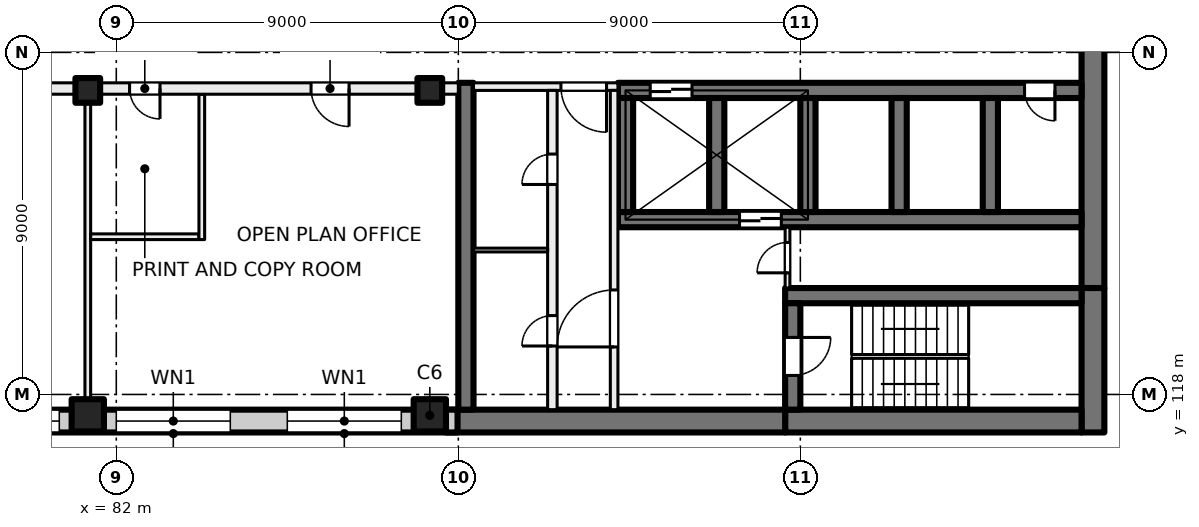
"""IFC4 building model, lengths in metres.
Left out: names, types, materials, properties, quantities, classifications, styles, units other than length and angle.
Written with IfcOpenShell. Run it as: python <this file> out.ifc"""

import sys

from ifc_helpers import new_model, si_unit, direction, frame, frame_2d, origin, origin_2d, place, context, subcontext, project, spatial, rectangle, extrude, element, fill, save


model = new_model("IFC4")
c1 = context("Model", 3, precision=1e-05, world=origin(), true_north=direction((0.0, 1.0)))
c2 = subcontext(c1, "Body", "Model", "MODEL_VIEW")
j1 = project(units=[si_unit("LENGTHUNIT", "METRE"), si_unit("PLANEANGLEUNIT", "RADIAN")], contexts=[c1])
p1 = place(None, origin())
s1 = spatial("IfcSite", under=j1, at=p1, CompositionType="ELEMENT")
p2 = place(p1, origin())
s2 = spatial("IfcBuilding", under=s1, at=p2, CompositionType="ELEMENT")
p3 = place(p2, frame((0.0, 0.0, 93.0)))
s3 = spatial("IfcBuildingStorey", under=s2, at=p3, CompositionType="ELEMENT", Elevation=93.0)
for number, where, z_axis, x_axis in (
    (1, (81.25, 126.0, 0.0), (0.0, 0.0, 1.0), (1.0, 0.0, 0.0)),
    (2, (90.25, 126.0, 0.0), (0.0, 0.0, 1.0), (1.0, 0.0, 0.0)),
):
    element("IfcColumn", number, at=place(p3, frame(where, z_axis=z_axis, x_axis=x_axis)), inside=s3, PredefinedType="COLUMN", context=c2, shape_type="SweptSolid", body=[
        extrude(rectangle(XDim=0.65, YDim=0.65, at=origin_2d()), origin(), (0.0, 0.0, 1.0), 4.0),
    ])
for number, where, z_axis, x_axis in (
    (3, (81.25, 117.45, 0.0), (0.0, 0.0, 1.0), (1.0, 0.0, 0.0)),
    (4, (90.25, 117.45, 0.0), (0.0, 0.0, 1.0), (1.0, 0.0, 0.0)),
):
    element("IfcColumn", number, at=place(p3, frame(where, z_axis=z_axis, x_axis=x_axis)), inside=s3, PredefinedType="COLUMN", context=c2, shape_type="SweptSolid", body=[
        extrude(rectangle(XDim=0.85, YDim=0.85, at=origin_2d()), origin(), (0.0, 0.0, 1.0), 4.0),
    ])
p4 = place(p3, frame((107.7, 135.2, 0.0), z_axis=(0.0, 0.0, 1.0), x_axis=(0.0, -1.0, 0.0)))
e5 = element("IfcWall", 5, at=p4, inside=s3, PredefinedType="SHEAR", context=c2, shape_type="SweptSolid", body=[
    extrude(rectangle(XDim=14.4, YDim=0.6, at=frame_2d((7.2, 0.0))), origin(), (0.0, 0.0, 1.0), 4.0),
])
p5 = place(p3, frame((107.7, 120.8, 0.0), z_axis=(0.0, 0.0, 1.0), x_axis=(0.0, -1.0, 0.0)))
e6 = element("IfcWall", 6, at=p5, inside=s3, PredefinedType="SHEAR", context=c2, shape_type="SweptSolid", body=[
    extrude(rectangle(XDim=3.8, YDim=0.6, at=frame_2d((1.9, 0.0))), origin(), (0.0, 0.0, 1.0), 4.0),
])
p6 = place(p3, frame((107.4, 117.3, 0.0), z_axis=(0.0, 0.0, 1.0), x_axis=(-1.0, 0.0, 0.0)))
e7 = element("IfcWall", 7, at=p6, inside=s3, PredefinedType="SHEAR", context=c2, shape_type="SweptSolid", body=[
    extrude(rectangle(XDim=7.8, YDim=0.6, at=frame_2d((3.9, 0.0))), origin(), (0.0, 0.0, 1.0), 4.0),
])
p7 = place(p3, frame((99.6, 117.3, 0.0), z_axis=(0.0, 0.0, 1.0), x_axis=(-1.0, 0.0, 0.0)))
e8 = element("IfcWall", 8, at=p7, inside=s3, PredefinedType="SHEAR", context=c2, shape_type="SweptSolid", body=[
    extrude(rectangle(XDim=8.925, YDim=0.6, at=frame_2d((4.462, 0.0))), origin(), (0.0, 0.0, 1.0), 4.0),
])
p8 = place(p3, frame((107.4, 120.6, 0.0), z_axis=(0.0, 0.0, 1.0), x_axis=(-1.0, 0.0, 0.0)))
e9 = element("IfcWall", 9, at=p8, inside=s3, PredefinedType="SHEAR", context=c2, shape_type="SweptSolid", body=[
    extrude(rectangle(XDim=7.8, YDim=0.4, at=frame_2d((3.9, 0.0))), origin(), (0.0, 0.0, 1.0), 4.0),
])
p9 = place(p3, frame((99.8, 120.4, 0.0), z_axis=(0.0, 0.0, 1.0), x_axis=(0.0, -1.0, 0.0)))
e10 = element("IfcWall", 10, at=p9, inside=s3, PredefinedType="SHEAR", context=c2, shape_type="SweptSolid", body=[
    extrude(rectangle(XDim=2.8, YDim=0.4, at=frame_2d((1.4, 0.0))), origin(), (0.0, 0.0, 1.0), 4.0),
])
p10 = place(p9, frame((0.9, 0.0, 0.0)))
e11 = element("IfcOpeningElement", 11, at=p10, cuts=e10, PredefinedType="OPENING", context=c2, shape_type="SweptSolid", body=[
    extrude(rectangle(XDim=1.0, YDim=2.1, at=frame_2d((0.5, 1.05))), frame((0.0, 0.21, 0.0), z_axis=(0.0, -1.0, 0.0), x_axis=(1.0, 0.0, 0.0)), (0.0, 0.0, 1.0), 0.42),
])
p11 = place(p3, frame((107.4, 126.0, 0.0), z_axis=(0.0, 0.0, 1.0), x_axis=(-1.0, 0.0, 0.0)))
e12 = element("IfcWall", 12, at=p11, inside=s3, PredefinedType="SHEAR", context=c2, shape_type="SweptSolid", body=[
    extrude(rectangle(XDim=12.2, YDim=0.4, at=frame_2d((6.1, 0.0))), origin(), (0.0, 0.0, 1.0), 4.0),
])
p12 = place(p11, frame((10.25, 0.0, 0.0)))
e13 = element("IfcOpeningElement", 13, at=p12, cuts=e12, PredefinedType="OPENING", context=c2, shape_type="SweptSolid", body=[
    extrude(rectangle(XDim=1.1, YDim=2.1, at=frame_2d((0.55, 1.05))), frame((0.0, 0.21, 0.0), z_axis=(0.0, -1.0, 0.0), x_axis=(1.0, 0.0, 0.0)), (0.0, 0.0, 1.0), 0.42),
])
p13 = place(p11, frame((0.7, 0.0, 0.0)))
e14 = element("IfcOpeningElement", 14, at=p13, cuts=e12, PredefinedType="OPENING", context=c2, shape_type="SweptSolid", body=[
    extrude(rectangle(XDim=0.8, YDim=2.1, at=frame_2d((0.4, 1.05))), frame((0.0, 0.21, 0.0), z_axis=(0.0, -1.0, 0.0), x_axis=(1.0, 0.0, 0.0)), (0.0, 0.0, 1.0), 0.42),
])
p14 = place(p3, frame((107.4, 122.6, 0.0), z_axis=(0.0, 0.0, 1.0), x_axis=(-1.0, 0.0, 0.0)))
e15 = element("IfcWall", 15, at=p14, inside=s3, PredefinedType="SHEAR", context=c2, shape_type="SweptSolid", body=[
    extrude(rectangle(XDim=12.2, YDim=0.4, at=frame_2d((6.1, 0.0))), origin(), (0.0, 0.0, 1.0), 4.0),
])
p15 = place(p14, frame((7.9, 0.0, 0.0)))
e16 = element("IfcOpeningElement", 16, at=p15, cuts=e15, PredefinedType="OPENING", context=c2, shape_type="SweptSolid", body=[
    extrude(rectangle(XDim=1.1, YDim=2.1, at=frame_2d((0.55, 1.05))), frame((0.0, 0.21, 0.0), z_axis=(0.0, -1.0, 0.0), x_axis=(1.0, 0.0, 0.0)), (0.0, 0.0, 1.0), 0.42),
])
for number, where, z_axis, x_axis in (
    (17, (105.0, 125.8, 0.0), (0.0, 0.0, 1.0), (0.0, -1.0, 0.0)),
    (18, (102.6, 125.8, 0.0), (0.0, 0.0, 1.0), (0.0, -1.0, 0.0)),
    (19, (100.2, 125.8, 0.0), (0.0, 0.0, 1.0), (0.0, -1.0, 0.0)),
    (20, (97.8, 125.8, 0.0), (0.0, 0.0, 1.0), (0.0, -1.0, 0.0)),
    (21, (95.4, 125.8, 0.0), (0.0, 0.0, 1.0), (0.0, -1.0, 0.0)),
):
    element("IfcWall", number, at=place(p3, frame(where, z_axis=z_axis, x_axis=x_axis)), inside=s3, PredefinedType="SHEAR", context=c2, shape_type="SweptSolid", body=[
        extrude(rectangle(XDim=3.0, YDim=0.4, at=frame_2d((1.5, 0.0))), origin(), (0.0, 0.0, 1.0), 4.0),
    ])
p16 = place(p3, frame((91.2, 126.2, 0.0), z_axis=(0.0, 0.0, 1.0), x_axis=(0.0, -1.0, 0.0)))
e22 = element("IfcWall", 22, at=p16, inside=s3, PredefinedType="SHEAR", context=c2, shape_type="SweptSolid", body=[
    extrude(rectangle(XDim=8.6, YDim=0.4, at=frame_2d((4.3, 0.0))), origin(), (0.0, 0.0, 1.0), 4.0),
])
p17 = place(p3, frame((90.98, 117.3, 0.0), z_axis=(0.0, 0.0, 1.0), x_axis=(-1.0, 0.0, 0.0)))
e23 = element("IfcWall", 23, at=p17, inside=s3, PredefinedType="SOLIDWALL", context=c2, shape_type="SweptSolid", body=[
    extrude(rectangle(XDim=33.745, YDim=0.6, at=frame_2d((16.873, 0.0))), origin(), (0.0, 0.0, 1.0), 3.625),
])
p18 = place(p17, frame((1.48, 0.0, 0.9)))
e24 = element("IfcOpeningElement", 24, at=p18, cuts=e23, PredefinedType="OPENING", context=c2, shape_type="SweptSolid", body=[
    extrude(rectangle(XDim=3.0, YDim=2.4, at=frame_2d((1.5, 1.2))), frame((0.0, 0.31, 0.0), z_axis=(0.0, -1.0, 0.0), x_axis=(1.0, 0.0, 0.0)), (0.0, 0.0, 1.0), 0.62),
])
p19 = place(p17, frame((5.98, 0.0, 0.9)))
e25 = element("IfcOpeningElement", 25, at=p19, cuts=e23, PredefinedType="OPENING", context=c2, shape_type="SweptSolid", body=[
    extrude(rectangle(XDim=3.0, YDim=2.4, at=frame_2d((1.5, 1.2))), frame((0.0, 0.31, 0.0), z_axis=(0.0, -1.0, 0.0), x_axis=(1.0, 0.0, 0.0)), (0.0, 0.0, 1.0), 0.62),
])
p20 = place(p17, frame((10.48, 0.0, 0.9)))
e26 = element("IfcOpeningElement", 26, at=p20, cuts=e23, PredefinedType="OPENING", context=c2, shape_type="SweptSolid", body=[
    extrude(rectangle(XDim=3.0, YDim=2.4, at=frame_2d((1.5, 1.2))), frame((0.0, 0.31, 0.0), z_axis=(0.0, -1.0, 0.0), x_axis=(1.0, 0.0, 0.0)), (0.0, 0.0, 1.0), 0.62),
])
p21 = place(p17, frame((14.98, 0.0, 0.9)))
e27 = element("IfcOpeningElement", 27, at=p21, cuts=e23, PredefinedType="OPENING", context=c2, shape_type="SweptSolid", body=[
    extrude(rectangle(XDim=3.0, YDim=2.4, at=frame_2d((1.5, 1.2))), frame((0.0, 0.31, 0.0), z_axis=(0.0, -1.0, 0.0), x_axis=(1.0, 0.0, 0.0)), (0.0, 0.0, 1.0), 0.62),
])
p22 = place(p17, frame((20.08, 0.0, 0.0)))
e28 = element("IfcOpeningElement", 28, at=p22, cuts=e23, PredefinedType="OPENING", context=c2, shape_type="SweptSolid", body=[
    extrude(rectangle(XDim=1.8, YDim=2.4, at=frame_2d((0.9, 1.2))), frame((0.0, 0.31, 0.0), z_axis=(0.0, -1.0, 0.0), x_axis=(1.0, 0.0, 0.0)), (0.0, 0.0, 1.0), 0.62),
])
p23 = place(p17, frame((23.98, 0.0, 0.9)))
e29 = element("IfcOpeningElement", 29, at=p23, cuts=e23, PredefinedType="OPENING", context=c2, shape_type="SweptSolid", body=[
    extrude(rectangle(XDim=3.0, YDim=2.4, at=frame_2d((1.5, 1.2))), frame((0.0, 0.31, 0.0), z_axis=(0.0, -1.0, 0.0), x_axis=(1.0, 0.0, 0.0)), (0.0, 0.0, 1.0), 0.62),
])
p24 = place(p17, frame((28.48, 0.0, 0.9)))
e30 = element("IfcOpeningElement", 30, at=p24, cuts=e23, PredefinedType="OPENING", context=c2, shape_type="SweptSolid", body=[
    extrude(rectangle(XDim=3.0, YDim=2.4, at=frame_2d((1.5, 1.2))), frame((0.0, 0.31, 0.0), z_axis=(0.0, -1.0, 0.0), x_axis=(1.0, 0.0, 0.0)), (0.0, 0.0, 1.0), 0.62),
])
p25 = place(p3, frame((95.2, 126.1, 0.0), z_axis=(0.0, 0.0, 1.0), x_axis=(-1.0, 0.0, 0.0)))
e31 = element("IfcWall", 31, at=p25, inside=s3, PredefinedType="PARTITIONING", context=c2, shape_type="SweptSolid", body=[
    extrude(rectangle(XDim=3.8, YDim=0.2, at=frame_2d((1.9, 0.0))), origin(), (0.0, 0.0, 1.0), 3.625),
])
p26 = place(p25, frame((0.3, 0.0, 0.0)))
e32 = element("IfcOpeningElement", 32, at=p26, cuts=e31, PredefinedType="OPENING", context=c2, shape_type="SweptSolid", body=[
    extrude(rectangle(XDim=1.2, YDim=2.1, at=frame_2d((0.6, 1.05))), frame((0.0, 0.11, 0.0), z_axis=(0.0, -1.0, 0.0), x_axis=(1.0, 0.0, 0.0)), (0.0, 0.0, 1.0), 0.22),
])
p27 = place(p3, frame((95.1, 117.6, 0.0), z_axis=(0.0, 0.0, 1.0), x_axis=(0.0, 1.0, 0.0)))
e33 = element("IfcWall", 33, at=p27, inside=s3, PredefinedType="PARTITIONING", context=c2, shape_type="SweptSolid", body=[
    extrude(rectangle(XDim=8.4, YDim=0.2, at=frame_2d((4.2, 0.0))), origin(), (0.0, 0.0, 1.0), 3.625),
])
p28 = place(p27, frame((1.65, 0.0, 0.0)))
e34 = element("IfcOpeningElement", 34, at=p28, cuts=e33, PredefinedType="OPENING", context=c2, shape_type="SweptSolid", body=[
    extrude(rectangle(XDim=1.5, YDim=2.1, at=frame_2d((0.75, 1.05))), frame((0.0, 0.11, 0.0), z_axis=(0.0, -1.0, 0.0), x_axis=(1.0, 0.0, 0.0)), (0.0, 0.0, 1.0), 0.22),
])
p29 = place(p3, frame((93.475, 117.6, 0.0), z_axis=(0.0, 0.0, 1.0), x_axis=(0.0, 1.0, 0.0)))
e35 = element("IfcWall", 35, at=p29, inside=s3, PredefinedType="PARTITIONING", context=c2, shape_type="SweptSolid", body=[
    extrude(rectangle(XDim=8.4, YDim=0.25, at=frame_2d((4.2, 0.0))), origin(), (0.0, 0.0, 1.0), 3.625),
])
p30 = place(p29, frame((5.925, 0.0, 0.0)))
e36 = element("IfcOpeningElement", 36, at=p30, cuts=e35, PredefinedType="OPENING", context=c2, shape_type="SweptSolid", body=[
    extrude(rectangle(XDim=0.8, YDim=2.1, at=frame_2d((0.4, 1.05))), frame((0.0, 0.135, 0.0), z_axis=(0.0, -1.0, 0.0), x_axis=(1.0, 0.0, 0.0)), (0.0, 0.0, 1.0), 0.27),
])
p31 = place(p29, frame((1.675, 0.0, 0.0)))
e37 = element("IfcOpeningElement", 37, at=p31, cuts=e35, PredefinedType="OPENING", context=c2, shape_type="SweptSolid", body=[
    extrude(rectangle(XDim=0.8, YDim=2.1, at=frame_2d((0.4, 1.05))), frame((0.0, 0.135, 0.0), z_axis=(0.0, -1.0, 0.0), x_axis=(1.0, 0.0, 0.0)), (0.0, 0.0, 1.0), 0.27),
])
p32 = place(p3, frame((99.663, 120.8, 0.0), z_axis=(0.0, 0.0, 1.0), x_axis=(0.0, 1.0, 0.0)))
e38 = element("IfcWall", 38, at=p32, inside=s3, PredefinedType="PARTITIONING", context=c2, shape_type="SweptSolid", body=[
    extrude(rectangle(XDim=1.6, YDim=0.125, at=frame_2d((0.8, 0.0))), origin(), (0.0, 0.0, 1.0), 3.625),
])
p33 = place(p32, frame((0.4, 0.0, 0.0)))
e39 = element("IfcOpeningElement", 39, at=p33, cuts=e38, PredefinedType="OPENING", context=c2, shape_type="SweptSolid", body=[
    extrude(rectangle(XDim=0.8, YDim=2.1, at=frame_2d((0.4, 1.05))), frame((0.0, 0.073, 0.0), z_axis=(0.0, -1.0, 0.0), x_axis=(1.0, 0.0, 0.0)), (0.0, 0.0, 1.0), 0.145),
])
p34 = place(p3, frame((93.35, 121.8, 0.0), z_axis=(0.0, 0.0, 1.0), x_axis=(-1.0, 0.0, 0.0)))
e40 = element("IfcWall", 40, at=p34, inside=s3, PredefinedType="PARTITIONING", context=c2, shape_type="SweptSolid", body=[
    extrude(rectangle(XDim=1.95, YDim=0.1, at=frame_2d((0.975, 0.0))), origin(), (0.0, 0.0, 1.0), 3.625),
])
p35 = place(p3, frame((81.25, 117.6, 0.0), z_axis=(0.0, 0.0, 1.0), x_axis=(0.0, 1.0, 0.0)))
e41 = element("IfcWall", 41, at=p35, inside=s3, PredefinedType="PARTITIONING", context=c2, shape_type="SweptSolid", body=[
    extrude(rectangle(XDim=8.3, YDim=0.15, at=frame_2d((4.15, 0.0))), origin(), (0.0, 0.0, 1.0), 3.625),
])
p36 = place(p3, frame((84.175, 122.15, 0.0), z_axis=(0.0, 0.0, 1.0), x_axis=(-1.0, 0.0, 0.0)))
e42 = element("IfcWall", 42, at=p36, inside=s3, PredefinedType="PARTITIONING", context=c2, shape_type="SweptSolid", body=[
    extrude(rectangle(XDim=2.85, YDim=0.15, at=frame_2d((1.425, 0.0))), origin(), (0.0, 0.0, 1.0), 3.625),
])
p37 = place(p3, frame((84.25, 125.9, 0.0), z_axis=(0.0, 0.0, 1.0), x_axis=(0.0, -1.0, 0.0)))
e43 = element("IfcWall", 43, at=p37, inside=s3, PredefinedType="PARTITIONING", context=c2, shape_type="SweptSolid", body=[
    extrude(rectangle(XDim=3.825, YDim=0.15, at=frame_2d((1.913, 0.0))), origin(), (0.0, 0.0, 1.0), 3.625),
])
p38 = place(p3, frame((91.0, 126.05, 0.0), z_axis=(0.0, 0.0, 1.0), x_axis=(-1.0, 0.0, 0.0)))
e44 = element("IfcWall", 44, at=p38, inside=s3, PredefinedType="PARTITIONING", context=c2, shape_type="SweptSolid", body=[
    extrude(rectangle(XDim=43.785, YDim=0.3, at=frame_2d((21.893, 0.0))), origin(), (0.0, 0.0, 1.0), 3.625),
])
p39 = place(p38, frame((7.85, 0.0, 0.0)))
e45 = element("IfcOpeningElement", 45, at=p39, cuts=e44, PredefinedType="OPENING", context=c2, shape_type="SweptSolid", body=[
    extrude(rectangle(XDim=0.8, YDim=2.1, at=frame_2d((0.4, 1.05))), frame((0.0, 0.16, 0.0), z_axis=(0.0, -1.0, 0.0), x_axis=(1.0, 0.0, 0.0)), (0.0, 0.0, 1.0), 0.32),
])
p40 = place(p38, frame((2.875, 0.0, 0.0)))
e46 = element("IfcOpeningElement", 46, at=p40, cuts=e44, PredefinedType="OPENING", context=c2, shape_type="SweptSolid", body=[
    extrude(rectangle(XDim=1.0, YDim=2.1, at=frame_2d((0.5, 1.05))), frame((0.0, 0.16, 0.0), z_axis=(0.0, -1.0, 0.0), x_axis=(1.0, 0.0, 0.0)), (0.0, 0.0, 1.0), 0.32),
])
p41 = place(p38, frame((15.6, 0.0, 0.0)))
e47 = element("IfcOpeningElement", 47, at=p41, cuts=e44, PredefinedType="OPENING", context=c2, shape_type="SweptSolid", body=[
    extrude(rectangle(XDim=1.8, YDim=2.1, at=frame_2d((0.9, 1.05))), frame((0.0, 0.16, 0.0), z_axis=(0.0, -1.0, 0.0), x_axis=(1.0, 0.0, 0.0)), (0.0, 0.0, 1.0), 0.32),
])
p42 = place(p38, frame((25.0, 0.0, 0.0)))
e48 = element("IfcOpeningElement", 48, at=p42, cuts=e44, PredefinedType="OPENING", context=c2, shape_type="SweptSolid", body=[
    extrude(rectangle(XDim=1.0, YDim=2.1, at=frame_2d((0.5, 1.05))), frame((0.0, 0.16, 0.0), z_axis=(0.0, -1.0, 0.0), x_axis=(1.0, 0.0, 0.0)), (0.0, 0.0, 1.0), 0.32),
])
p43 = place(p38, frame((39.296, 0.0, 0.0)))
e49 = element("IfcOpeningElement", 49, at=p43, cuts=e44, PredefinedType="OPENING", context=c2, shape_type="SweptSolid", body=[
    extrude(rectangle(XDim=1.8, YDim=2.1, at=frame_2d((0.9, 1.05))), frame((0.0, 0.16, 0.0), z_axis=(0.0, -1.0, 0.0), x_axis=(1.0, 0.0, 0.0)), (0.0, 0.0, 1.0), 0.32),
])
p44 = place(p18, origin())
e50 = element("IfcWindow", 50, at=p44, inside=s3, PartitioningType="SINGLE_PANEL", PredefinedType="WINDOW", context=c2, shape_type="SweptSolid", body=[
    extrude(rectangle(XDim=3.0, YDim=2.4, at=frame_2d((1.5, 1.2))), frame((0.0, 0.03, 0.0), z_axis=(0.0, -1.0, 0.0), x_axis=(1.0, 0.0, 0.0)), (0.0, 0.0, 1.0), 0.06),
])
fill(e24, e50)
p45 = place(p19, origin())
e51 = element("IfcWindow", 51, at=p45, inside=s3, PartitioningType="SINGLE_PANEL", PredefinedType="WINDOW", context=c2, shape_type="SweptSolid", body=[
    extrude(rectangle(XDim=3.0, YDim=2.4, at=frame_2d((1.5, 1.2))), frame((0.0, 0.03, 0.0), z_axis=(0.0, -1.0, 0.0), x_axis=(1.0, 0.0, 0.0)), (0.0, 0.0, 1.0), 0.06),
])
fill(e25, e51)
p46 = place(p20, origin())
e52 = element("IfcWindow", 52, at=p46, inside=s3, PartitioningType="SINGLE_PANEL", PredefinedType="WINDOW", context=c2, shape_type="SweptSolid", body=[
    extrude(rectangle(XDim=3.0, YDim=2.4, at=frame_2d((1.5, 1.2))), frame((0.0, 0.03, 0.0), z_axis=(0.0, -1.0, 0.0), x_axis=(1.0, 0.0, 0.0)), (0.0, 0.0, 1.0), 0.06),
])
fill(e26, e52)
p47 = place(p12, origin())
e53 = element("IfcDoor", 53, at=p47, inside=s3, OperationType="DOUBLE_DOOR_SLIDING", PredefinedType="DOOR", context=c2, shape_type="SweptSolid", body=[
    extrude(rectangle(XDim=1.1, YDim=2.1, at=frame_2d((0.55, 1.05))), frame((0.0, 0.025, 0.0), z_axis=(0.0, -1.0, 0.0), x_axis=(1.0, 0.0, 0.0)), (0.0, 0.0, 1.0), 0.05),
])
fill(e13, e53)
p48 = place(p13, origin())
e54 = element("IfcDoor", 54, at=p48, inside=s3, OperationType="SINGLE_SWING_LEFT", PredefinedType="DOOR", context=c2, shape_type="SweptSolid", body=[
    extrude(rectangle(XDim=0.8, YDim=2.1, at=frame_2d((0.4, 1.05))), frame((0.0, 0.025, 0.0), z_axis=(0.0, -1.0, 0.0), x_axis=(1.0, 0.0, 0.0)), (0.0, 0.0, 1.0), 0.05),
])
fill(e14, e54)
p49 = place(p26, origin())
e55 = element("IfcDoor", 55, at=p49, inside=s3, OperationType="DOUBLE_DOOR_SINGLE_SWING", PredefinedType="DOOR", context=c2, shape_type="SweptSolid", body=[
    extrude(rectangle(XDim=1.2, YDim=2.1, at=frame_2d((0.6, 1.05))), frame((0.0, 0.025, 0.0), z_axis=(0.0, -1.0, 0.0), x_axis=(1.0, 0.0, 0.0)), (0.0, 0.0, 1.0), 0.05),
])
fill(e32, e55)
p50 = place(p28, origin())
e56 = element("IfcDoor", 56, at=p50, inside=s3, OperationType="DOUBLE_DOOR_SINGLE_SWING", PredefinedType="DOOR", context=c2, shape_type="SweptSolid", body=[
    extrude(rectangle(XDim=1.5, YDim=2.1, at=frame_2d((0.75, 1.05))), frame((0.0, 0.025, 0.0), z_axis=(0.0, -1.0, 0.0), x_axis=(1.0, 0.0, 0.0)), (0.0, 0.0, 1.0), 0.05),
])
fill(e34, e56)
p51 = place(p10, origin())
e57 = element("IfcDoor", 57, at=p51, inside=s3, OperationType="SINGLE_SWING_LEFT", PredefinedType="DOOR", context=c2, shape_type="SweptSolid", body=[
    extrude(rectangle(XDim=1.0, YDim=2.1, at=frame_2d((0.5, 1.05))), frame((0.0, 0.025, 0.0), z_axis=(0.0, -1.0, 0.0), x_axis=(1.0, 0.0, 0.0)), (0.0, 0.0, 1.0), 0.05),
])
fill(e11, e57)
p52 = place(p33, origin())
e58 = element("IfcDoor", 58, at=p52, inside=s3, OperationType="SINGLE_SWING_RIGHT", PredefinedType="DOOR", context=c2, shape_type="SweptSolid", body=[
    extrude(rectangle(XDim=0.8, YDim=2.1, at=frame_2d((0.4, 1.05))), frame((0.0, 0.025, 0.0), z_axis=(0.0, -1.0, 0.0), x_axis=(1.0, 0.0, 0.0)), (0.0, 0.0, 1.0), 0.05),
])
fill(e39, e58)
p53 = place(p30, origin())
e59 = element("IfcDoor", 59, at=p53, inside=s3, OperationType="SINGLE_SWING_LEFT", PredefinedType="DOOR", context=c2, shape_type="SweptSolid", body=[
    extrude(rectangle(XDim=0.8, YDim=2.1, at=frame_2d((0.4, 1.05))), frame((0.0, 0.025, 0.0), z_axis=(0.0, -1.0, 0.0), x_axis=(1.0, 0.0, 0.0)), (0.0, 0.0, 1.0), 0.05),
])
fill(e36, e59)
p54 = place(p31, origin())
e60 = element("IfcDoor", 60, at=p54, inside=s3, OperationType="SINGLE_SWING_RIGHT", PredefinedType="DOOR", context=c2, shape_type="SweptSolid", body=[
    extrude(rectangle(XDim=0.8, YDim=2.1, at=frame_2d((0.4, 1.05))), frame((0.0, 0.025, 0.0), z_axis=(0.0, -1.0, 0.0), x_axis=(1.0, 0.0, 0.0)), (0.0, 0.0, 1.0), 0.05),
])
fill(e37, e60)
p55 = place(p15, origin())
e61 = element("IfcDoor", 61, at=p55, inside=s3, OperationType="DOUBLE_DOOR_SLIDING", PredefinedType="DOOR", context=c2, shape_type="SweptSolid", body=[
    extrude(rectangle(XDim=1.1, YDim=2.1, at=frame_2d((0.55, 1.05))), frame((0.0, 0.025, 0.0), z_axis=(0.0, -1.0, 0.0), x_axis=(1.0, 0.0, 0.0)), (0.0, 0.0, 1.0), 0.05),
])
fill(e16, e61)
p56 = place(p39, origin())
e62 = element("IfcDoor", 62, at=p56, inside=s3, OperationType="SINGLE_SWING_RIGHT", PredefinedType="DOOR", context=c2, shape_type="SweptSolid", body=[
    extrude(rectangle(XDim=0.8, YDim=2.1, at=frame_2d((0.4, 1.05))), frame((0.0, 0.025, 0.0), z_axis=(0.0, -1.0, 0.0), x_axis=(1.0, 0.0, 0.0)), (0.0, 0.0, 1.0), 0.05),
])
fill(e45, e62)
p57 = place(p40, origin())
e63 = element("IfcDoor", 63, at=p57, inside=s3, OperationType="SINGLE_SWING_LEFT", PredefinedType="DOOR", context=c2, shape_type="SweptSolid", body=[
    extrude(rectangle(XDim=1.0, YDim=2.1, at=frame_2d((0.5, 1.05))), frame((0.0, 0.025, 0.0), z_axis=(0.0, -1.0, 0.0), x_axis=(1.0, 0.0, 0.0)), (0.0, 0.0, 1.0), 0.05),
])
fill(e46, e63)
save(model, sys.argv[1])
